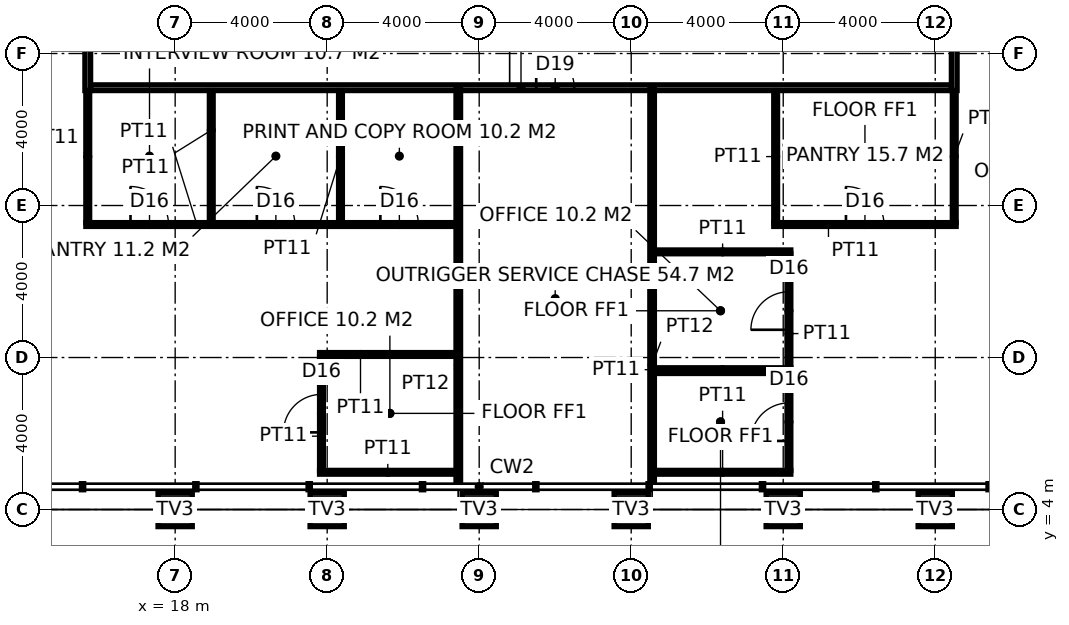
"""IFC4 building model, lengths in metres.
Left out: names, types, materials, properties, quantities, classifications, styles, units other than length and angle.
Written with IfcOpenShell. Run it as: python <this file> out.ifc"""

import sys

from ifc_helpers import new_model, si_unit, direction, frame, frame_2d, origin, origin_2d, place, context, subcontext, project, spatial, rectangle, hollow_rectangle, extrude, element, fill, save


model = new_model("IFC4")
c1 = context("Model", 3, precision=1e-05, world=origin(), true_north=direction((0.0, 1.0)))
c2 = subcontext(c1, "Body", "Model", "MODEL_VIEW")
j1 = project(units=[si_unit("LENGTHUNIT", "METRE"), si_unit("PLANEANGLEUNIT", "RADIAN")], contexts=[c1])
p1 = place(None, origin())
s1 = spatial("IfcSite", under=j1, at=p1, CompositionType="ELEMENT")
p2 = place(p1, origin())
s2 = spatial("IfcBuilding", under=s1, at=p2, CompositionType="ELEMENT")
p3 = place(p2, frame((0.0, 0.0, 270.2)))
s3 = spatial("IfcBuildingStorey", under=s2, at=p3, CompositionType="ELEMENT", Elevation=270.2)
for number, where, z_axis, x_axis in (
    (1, (18.0, 4.0, 0.0), (0.0, 0.0, 1.0), (1.0, 0.0, 0.0)),
    (2, (22.0, 4.0, 0.0), (0.0, 0.0, 1.0), (1.0, 0.0, 0.0)),
    (3, (26.0, 4.0, 0.0), (0.0, 0.0, 1.0), (1.0, 0.0, 0.0)),
    (4, (30.0, 4.0, 0.0), (0.0, 0.0, 1.0), (1.0, 0.0, 0.0)),
    (5, (34.0, 4.0, 0.0), (0.0, 0.0, 1.0), (1.0, 0.0, 0.0)),
    (6, (38.0, 4.0, 0.0), (0.0, 0.0, 1.0), (1.0, 0.0, 0.0)),
):
    element("IfcColumn", number, at=place(p3, frame(where, z_axis=z_axis, x_axis=x_axis)), inside=s3, PredefinedType="USERDEFINED", context=c2, shape_type="SweptSolid", body=[
        extrude(hollow_rectangle(XDim=0.9, YDim=0.9, WallThickness=0.08, at=origin_2d()), origin(), (0.0, 0.0, 1.0), 4.0),
    ])
p4 = place(p3, frame((15.7, 15.025, 0.0), z_axis=(0.0, 0.0, 1.0), x_axis=(0.0, 1.0, 0.0)))
e7 = element("IfcWall", 7, at=p4, inside=s3, PredefinedType="PARTITIONING", context=c2, shape_type="SweptSolid", body=[
    extrude(rectangle(XDim=23.35, YDim=0.15, at=frame_2d((11.675, 0.0))), origin(), (0.0, 0.0, 1.0), 3.85),
])
p5 = place(p4, frame((3.374, 0.0, 0.0)))
e8 = element("IfcOpeningElement", 8, at=p5, cuts=e7, PredefinedType="OPENING", context=c2, shape_type="SweptSolid", body=[
    extrude(rectangle(XDim=1.8, YDim=2.4, at=frame_2d((0.9, 1.2))), frame((0.0, 0.085, 0.0), z_axis=(0.0, -1.0, 0.0), x_axis=(1.0, 0.0, 0.0)), (0.0, 0.0, 1.0), 0.17),
])
p6 = place(p4, frame((17.476, 0.0, 0.0)))
e9 = element("IfcOpeningElement", 9, at=p6, cuts=e7, PredefinedType="OPENING", context=c2, shape_type="SweptSolid", body=[
    extrude(rectangle(XDim=1.8, YDim=2.4, at=frame_2d((0.9, 1.2))), frame((0.0, 0.085, 0.0), z_axis=(0.0, -1.0, 0.0), x_axis=(1.0, 0.0, 0.0)), (0.0, 0.0, 1.0), 0.17),
])
p7 = place(p4, frame((10.475, 0.0, 0.0)))
e10 = element("IfcOpeningElement", 10, at=p7, cuts=e7, PredefinedType="OPENING", context=c2, shape_type="SweptSolid", body=[
    extrude(rectangle(XDim=1.0, YDim=2.2, at=frame_2d((0.5, 1.1))), frame((0.0, 0.085, 0.0), z_axis=(0.0, -1.0, 0.0), x_axis=(1.0, 0.0, 0.0)), (0.0, 0.0, 1.0), 0.17),
])
p8 = place(p3, frame((38.5, 15.025, 0.0), z_axis=(0.0, 0.0, 1.0), x_axis=(0.0, 1.0, 0.0)))
e11 = element("IfcWall", 11, at=p8, inside=s3, PredefinedType="PARTITIONING", context=c2, shape_type="SweptSolid", body=[
    extrude(rectangle(XDim=23.35, YDim=0.15, at=frame_2d((11.675, 0.0))), origin(), (0.0, 0.0, 1.0), 2.85),
])
p9 = place(p8, frame((3.374, 0.0, 0.0)))
e12 = element("IfcOpeningElement", 12, at=p9, cuts=e11, PredefinedType="OPENING", context=c2, shape_type="SweptSolid", body=[
    extrude(rectangle(XDim=1.8, YDim=2.4, at=frame_2d((0.9, 1.2))), frame((0.0, 0.085, 0.0), z_axis=(0.0, -1.0, 0.0), x_axis=(1.0, 0.0, 0.0)), (0.0, 0.0, 1.0), 0.17),
])
p10 = place(p8, frame((17.476, 0.0, 0.0)))
e13 = element("IfcOpeningElement", 13, at=p10, cuts=e11, PredefinedType="OPENING", context=c2, shape_type="SweptSolid", body=[
    extrude(rectangle(XDim=1.8, YDim=2.4, at=frame_2d((0.9, 1.2))), frame((0.0, 0.085, 0.0), z_axis=(0.0, -1.0, 0.0), x_axis=(1.0, 0.0, 0.0)), (0.0, 0.0, 1.0), 0.17),
])
p11 = place(p8, frame((10.475, 0.0, 0.0)))
e14 = element("IfcOpeningElement", 14, at=p11, cuts=e11, PredefinedType="OPENING", context=c2, shape_type="SweptSolid", body=[
    extrude(rectangle(XDim=1.0, YDim=2.2, at=frame_2d((0.5, 1.1))), frame((0.0, 0.085, 0.0), z_axis=(0.0, -1.0, 0.0), x_axis=(1.0, 0.0, 0.0)), (0.0, 0.0, 1.0), 0.17),
])
p12 = place(p3, frame((15.775, 15.1, 0.0), z_axis=(0.0, 0.0, 1.0), x_axis=(1.0, 0.0, 0.0)))
e15 = element("IfcWall", 15, at=p12, inside=s3, PredefinedType="PARTITIONING", context=c2, shape_type="SweptSolid", body=[
    extrude(rectangle(XDim=22.65, YDim=0.15, at=frame_2d((11.325, 0.0))), origin(), (0.0, 0.0, 1.0), 3.85),
])
p13 = place(p12, frame((11.725, 0.0, 0.0)))
e16 = element("IfcOpeningElement", 16, at=p13, cuts=e15, PredefinedType="OPENING", context=c2, shape_type="SweptSolid", body=[
    extrude(rectangle(XDim=1.0, YDim=2.2, at=frame_2d((0.5, 1.1))), frame((0.0, 0.085, 0.0), z_axis=(0.0, -1.0, 0.0), x_axis=(1.0, 0.0, 0.0)), (0.0, 0.0, 1.0), 0.17),
])
for number, where, z_axis, x_axis in (
    (17, (25.45, 4.68, 0.0), (0.0, 0.0, 1.0), (0.0, 1.0, 0.0)),
    (18, (30.55, 4.68, 0.0), (0.0, 0.0, 1.0), (0.0, 1.0, 0.0)),
):
    element("IfcWall", number, at=place(p3, frame(where, z_axis=z_axis, x_axis=x_axis)), inside=s3, PredefinedType="PARTITIONING", context=c2, shape_type="SweptSolid", body=[
        extrude(rectangle(XDim=10.42, YDim=0.12, at=frame_2d((5.21, 0.0))), origin(), (0.0, 0.0, 1.0), 2.65),
    ])
for number, where, z_axis, x_axis in (
    (19, (21.8, 4.98, 0.0), (0.0, 0.0, 1.0), (1.0, 0.0, 0.0)),
    (20, (30.61, 4.98, 0.0), (0.0, 0.0, 1.0), (1.0, 0.0, 0.0)),
    (21, (30.61, 7.63, 0.0), (0.0, 0.0, 1.0), (1.0, 0.0, 0.0)),
    (22, (30.61, 7.68, 0.0), (0.0, 0.0, 1.0), (1.0, 0.0, 0.0)),
    (23, (21.8, 8.08, 0.0), (0.0, 0.0, 1.0), (1.0, 0.0, 0.0)),
    (24, (30.61, 10.78, 0.0), (0.0, 0.0, 1.0), (1.0, 0.0, 0.0)),
):
    element("IfcWall", number, at=place(p3, frame(where, z_axis=z_axis, x_axis=x_axis)), inside=s3, PredefinedType="PARTITIONING", context=c2, shape_type="SweptSolid", body=[
        extrude(rectangle(XDim=3.59, YDim=0.1, at=frame_2d((1.795, 0.0))), origin(), (0.0, 0.0, 1.0), 3.85),
    ])
p14 = place(p3, frame((15.65, 11.5, 0.0), z_axis=(0.0, 0.0, 1.0), x_axis=(1.0, 0.0, 0.0)))
e25 = element("IfcWall", 25, at=p14, inside=s3, PredefinedType="PARTITIONING", context=c2, shape_type="SweptSolid", body=[
    extrude(rectangle(XDim=9.739, YDim=0.1, at=frame_2d((4.87, 0.0))), origin(), (0.0, 0.0, 1.0), 3.85),
])
p15 = place(p14, frame((1.175, 0.0, 0.0)))
e26 = element("IfcOpeningElement", 26, at=p15, cuts=e25, PredefinedType="OPENING", context=c2, shape_type="SweptSolid", body=[
    extrude(rectangle(XDim=1.0, YDim=2.2, at=frame_2d((0.5, 1.1))), frame((0.0, 0.06, 0.0), z_axis=(0.0, -1.0, 0.0), x_axis=(1.0, 0.0, 0.0)), (0.0, 0.0, 1.0), 0.12),
])
p16 = place(p14, frame((4.5, 0.0, 0.0)))
e27 = element("IfcOpeningElement", 27, at=p16, cuts=e25, PredefinedType="OPENING", context=c2, shape_type="SweptSolid", body=[
    extrude(rectangle(XDim=1.0, YDim=2.2, at=frame_2d((0.5, 1.1))), frame((0.0, 0.06, 0.0), z_axis=(0.0, -1.0, 0.0), x_axis=(1.0, 0.0, 0.0)), (0.0, 0.0, 1.0), 0.12),
])
p17 = place(p14, frame((7.75, 0.0, 0.0)))
e28 = element("IfcOpeningElement", 28, at=p17, cuts=e25, PredefinedType="OPENING", context=c2, shape_type="SweptSolid", body=[
    extrude(rectangle(XDim=1.0, YDim=2.2, at=frame_2d((0.5, 1.1))), frame((0.0, 0.06, 0.0), z_axis=(0.0, -1.0, 0.0), x_axis=(1.0, 0.0, 0.0)), (0.0, 0.0, 1.0), 0.12),
])
p18 = place(p3, frame((33.751, 11.5, 0.0), z_axis=(0.0, 0.0, 1.0), x_axis=(1.0, 0.0, 0.0)))
e29 = element("IfcWall", 29, at=p18, inside=s3, PredefinedType="PARTITIONING", context=c2, shape_type="SweptSolid", body=[
    extrude(rectangle(XDim=4.799, YDim=0.1, at=frame_2d((2.399, 0.0))), origin(), (0.0, 0.0, 1.0), 3.85),
])
p19 = place(p18, frame((1.899, 0.0, 0.0)))
e30 = element("IfcOpeningElement", 30, at=p19, cuts=e29, PredefinedType="OPENING", context=c2, shape_type="SweptSolid", body=[
    extrude(rectangle(XDim=1.0, YDim=2.2, at=frame_2d((0.5, 1.1))), frame((0.0, 0.06, 0.0), z_axis=(0.0, -1.0, 0.0), x_axis=(1.0, 0.0, 0.0)), (0.0, 0.0, 1.0), 0.12),
])
for number, where, z_axis, x_axis in (
    (31, (15.7, 11.55, 0.0), (0.0, 0.0, 1.0), (0.0, 1.0, 0.0)),
    (32, (18.95, 11.55, 0.0), (0.0, 0.0, 1.0), (0.0, 1.0, 0.0)),
):
    element("IfcWall", number, at=place(p3, frame(where, z_axis=z_axis, x_axis=x_axis)), inside=s3, PredefinedType="PARTITIONING", context=c2, shape_type="SweptSolid", body=[
        extrude(rectangle(XDim=3.475, YDim=0.1, at=frame_2d((1.737, 0.0))), origin(), (0.0, 0.0, 1.0), 3.85),
    ])
p20 = place(p3, frame((21.85, 5.03, 0.0), z_axis=(0.0, 0.0, 1.0), x_axis=(0.0, 1.0, 0.0)))
e33 = element("IfcWall", 33, at=p20, inside=s3, PredefinedType="PARTITIONING", context=c2, shape_type="SweptSolid", body=[
    extrude(rectangle(XDim=3.0, YDim=0.1, at=frame_2d((1.5, 0.0))), origin(), (0.0, 0.0, 1.0), 2.95),
])
p21 = place(p20, frame((1.0, 0.0, 0.0)))
e34 = element("IfcOpeningElement", 34, at=p21, cuts=e33, PredefinedType="OPENING", context=c2, shape_type="SweptSolid", body=[
    extrude(rectangle(XDim=1.0, YDim=2.2, at=frame_2d((0.5, 1.1))), frame((0.0, 0.06, 0.0), z_axis=(0.0, -1.0, 0.0), x_axis=(1.0, 0.0, 0.0)), (0.0, 0.0, 1.0), 0.12),
])
for number, where, z_axis, x_axis in (
    (35, (22.35, 11.55, 0.0), (0.0, 0.0, 1.0), (0.0, 1.0, 0.0)),
    (36, (33.801, 11.55, 0.0), (0.0, 0.0, 1.0), (0.0, 1.0, 0.0)),
):
    element("IfcWall", number, at=place(p3, frame(where, z_axis=z_axis, x_axis=x_axis)), inside=s3, PredefinedType="PARTITIONING", context=c2, shape_type="SweptSolid", body=[
        extrude(rectangle(XDim=3.475, YDim=0.1, at=frame_2d((1.737, 0.0))), origin(), (0.0, 0.0, 1.0), 3.85),
    ])
p22 = place(p3, frame((34.15, 5.03, 0.0), z_axis=(0.0, 0.0, 1.0), x_axis=(0.0, 1.0, 0.0)))
e37 = element("IfcWall", 37, at=p22, inside=s3, PredefinedType="PARTITIONING", context=c2, shape_type="SweptSolid", body=[
    extrude(rectangle(XDim=2.55, YDim=0.1, at=frame_2d((1.275, 0.0))), origin(), (0.0, 0.0, 1.0), 2.95),
])
p23 = place(p22, frame((0.775, 0.0, 0.0)))
e38 = element("IfcOpeningElement", 38, at=p23, cuts=e37, PredefinedType="OPENING", context=c2, shape_type="SweptSolid", body=[
    extrude(rectangle(XDim=1.0, YDim=2.2, at=frame_2d((0.5, 1.1))), frame((0.0, 0.06, 0.0), z_axis=(0.0, -1.0, 0.0), x_axis=(1.0, 0.0, 0.0)), (0.0, 0.0, 1.0), 0.12),
])
p24 = place(p3, frame((34.15, 7.73, 0.0), z_axis=(0.0, 0.0, 1.0), x_axis=(0.0, 1.0, 0.0)))
e39 = element("IfcWall", 39, at=p24, inside=s3, PredefinedType="PARTITIONING", context=c2, shape_type="SweptSolid", body=[
    extrude(rectangle(XDim=3.0, YDim=0.1, at=frame_2d((1.5, 0.0))), origin(), (0.0, 0.0, 1.0), 2.95),
])
p25 = place(p24, frame((1.0, 0.0, 0.0)))
e40 = element("IfcOpeningElement", 40, at=p25, cuts=e39, PredefinedType="OPENING", context=c2, shape_type="SweptSolid", body=[
    extrude(rectangle(XDim=1.0, YDim=2.2, at=frame_2d((0.5, 1.1))), frame((0.0, 0.06, 0.0), z_axis=(0.0, -1.0, 0.0), x_axis=(1.0, 0.0, 0.0)), (0.0, 0.0, 1.0), 0.12),
])
p26 = place(p3, frame((38.5, 11.55, 0.0), z_axis=(0.0, 0.0, 1.0), x_axis=(0.0, 1.0, 0.0)))
e41 = element("IfcWall", 41, at=p26, inside=s3, PredefinedType="PARTITIONING", context=c2, shape_type="SweptSolid", body=[
    extrude(rectangle(XDim=3.475, YDim=0.1, at=frame_2d((1.737, 0.0))), origin(), (0.0, 0.0, 1.0), 3.85),
])
p27 = place(p13, origin())
e42 = element("IfcDoor", 42, at=p27, inside=s3, OperationType="SINGLE_SWING_LEFT", PredefinedType="DOOR", context=c2, shape_type="SweptSolid", body=[
    extrude(rectangle(XDim=1.0, YDim=2.2, at=frame_2d((0.5, 1.1))), frame((0.0, 0.025, 0.0), z_axis=(0.0, -1.0, 0.0), x_axis=(1.0, 0.0, 0.0)), (0.0, 0.0, 1.0), 0.05),
])
fill(e16, e42)
p28 = place(p15, origin())
e43 = element("IfcDoor", 43, at=p28, inside=s3, OperationType="SINGLE_SWING_LEFT", PredefinedType="DOOR", context=c2, shape_type="SweptSolid", body=[
    extrude(rectangle(XDim=1.0, YDim=2.2, at=frame_2d((0.5, 1.1))), frame((0.0, 0.025, 0.0), z_axis=(0.0, -1.0, 0.0), x_axis=(1.0, 0.0, 0.0)), (0.0, 0.0, 1.0), 0.05),
])
fill(e26, e43)
p29 = place(p16, origin())
e44 = element("IfcDoor", 44, at=p29, inside=s3, OperationType="SINGLE_SWING_LEFT", PredefinedType="DOOR", context=c2, shape_type="SweptSolid", body=[
    extrude(rectangle(XDim=1.0, YDim=2.2, at=frame_2d((0.5, 1.1))), frame((0.0, 0.025, 0.0), z_axis=(0.0, -1.0, 0.0), x_axis=(1.0, 0.0, 0.0)), (0.0, 0.0, 1.0), 0.05),
])
fill(e27, e44)
p30 = place(p17, origin())
e45 = element("IfcDoor", 45, at=p30, inside=s3, OperationType="SINGLE_SWING_LEFT", PredefinedType="DOOR", context=c2, shape_type="SweptSolid", body=[
    extrude(rectangle(XDim=1.0, YDim=2.2, at=frame_2d((0.5, 1.1))), frame((0.0, 0.025, 0.0), z_axis=(0.0, -1.0, 0.0), x_axis=(1.0, 0.0, 0.0)), (0.0, 0.0, 1.0), 0.05),
])
fill(e28, e45)
p31 = place(p19, origin())
e46 = element("IfcDoor", 46, at=p31, inside=s3, OperationType="SINGLE_SWING_LEFT", PredefinedType="DOOR", context=c2, shape_type="SweptSolid", body=[
    extrude(rectangle(XDim=1.0, YDim=2.2, at=frame_2d((0.5, 1.1))), frame((0.0, 0.025, 0.0), z_axis=(0.0, -1.0, 0.0), x_axis=(1.0, 0.0, 0.0)), (0.0, 0.0, 1.0), 0.05),
])
fill(e30, e46)
p32 = place(p21, origin())
e47 = element("IfcDoor", 47, at=p32, inside=s3, OperationType="SINGLE_SWING_LEFT", PredefinedType="DOOR", context=c2, shape_type="SweptSolid", body=[
    extrude(rectangle(XDim=1.0, YDim=2.2, at=frame_2d((0.5, 1.1))), frame((0.0, 0.025, 0.0), z_axis=(0.0, -1.0, 0.0), x_axis=(1.0, 0.0, 0.0)), (0.0, 0.0, 1.0), 0.05),
])
fill(e34, e47)
p33 = place(p23, origin())
e48 = element("IfcDoor", 48, at=p33, inside=s3, OperationType="SINGLE_SWING_LEFT", PredefinedType="DOOR", context=c2, shape_type="SweptSolid", body=[
    extrude(rectangle(XDim=1.0, YDim=2.2, at=frame_2d((0.5, 1.1))), frame((0.0, 0.025, 0.0), z_axis=(0.0, -1.0, 0.0), x_axis=(1.0, 0.0, 0.0)), (0.0, 0.0, 1.0), 0.05),
])
fill(e38, e48)
p34 = place(p25, origin())
e49 = element("IfcDoor", 49, at=p34, inside=s3, OperationType="SINGLE_SWING_LEFT", PredefinedType="DOOR", context=c2, shape_type="SweptSolid", body=[
    extrude(rectangle(XDim=1.0, YDim=2.2, at=frame_2d((0.5, 1.1))), frame((0.0, 0.025, 0.0), z_axis=(0.0, -1.0, 0.0), x_axis=(1.0, 0.0, 0.0)), (0.0, 0.0, 1.0), 0.05),
])
fill(e40, e49)
save(model, sys.argv[1])
